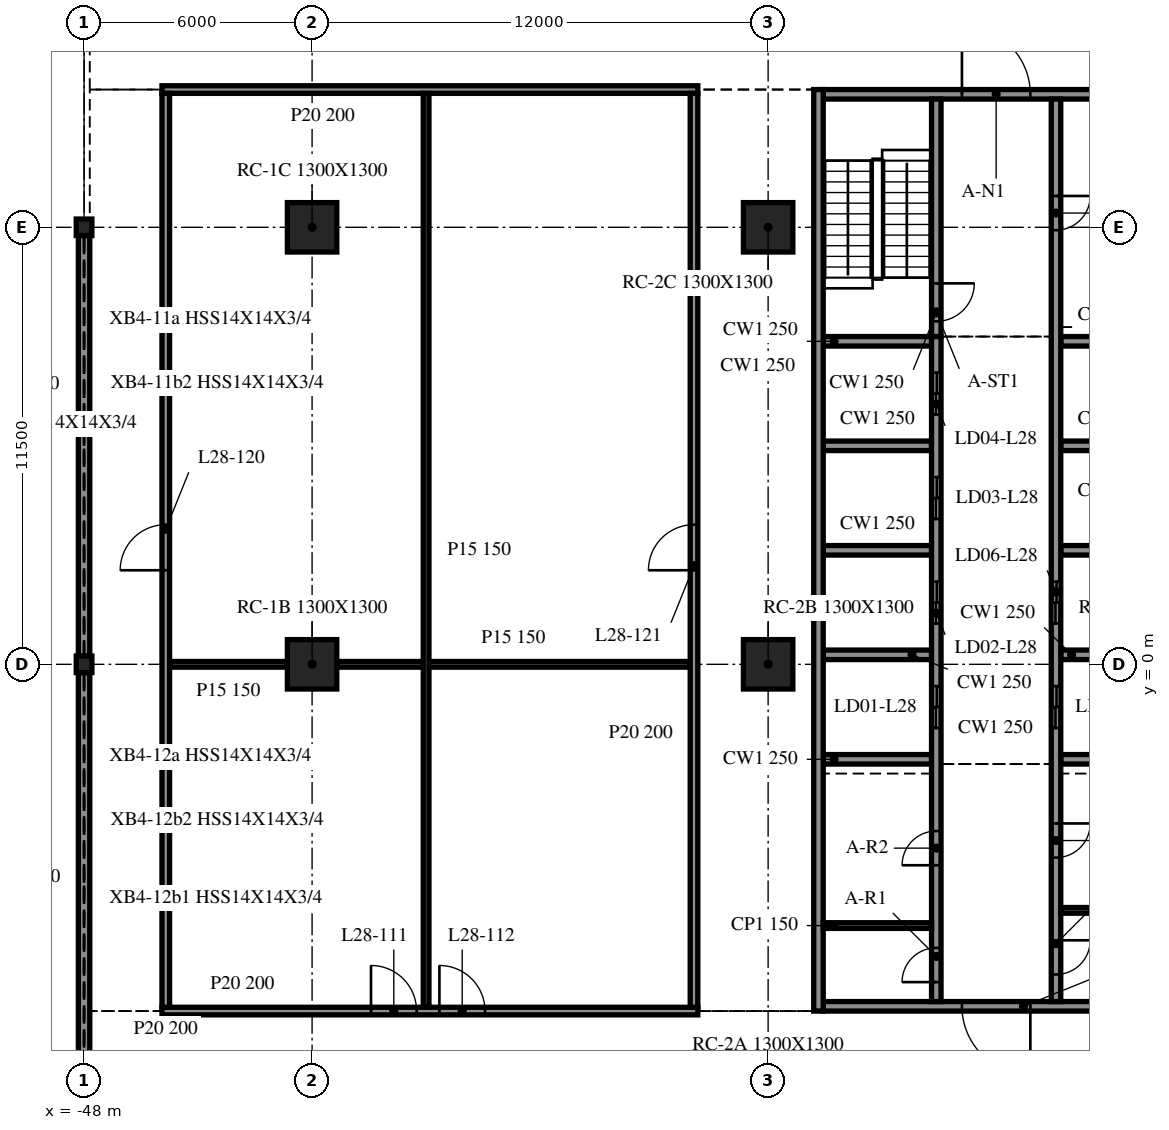
"""IFC4 building model, lengths in metres.
Left out: names, types, materials, properties, quantities, classifications, styles, units other than length and angle.
Written with IfcOpenShell. Run it as: python <this file> out.ifc"""

import sys

from ifc_helpers import new_model, si_unit, direction, frame, frame_2d, origin, origin_2d, place, context, subcontext, project, spatial, rectangle, i_section, extrude, element, fill, save


model = new_model("IFC4")
c1 = context("Model", 3, precision=1e-05, world=origin(), true_north=direction((0.0, 1.0)))
c2 = subcontext(c1, "Body", "Model", "MODEL_VIEW")
j1 = project(units=[si_unit("LENGTHUNIT", "METRE"), si_unit("PLANEANGLEUNIT", "RADIAN")], contexts=[c1])
p1 = place(None, origin())
s1 = spatial("IfcSite", under=j1, at=p1, CompositionType="ELEMENT")
p2 = place(p1, origin())
s2 = spatial("IfcBuilding", under=s1, at=p2, CompositionType="ELEMENT")
p3 = place(p2, frame((0.0, 0.0, 122.0)))
s3 = spatial("IfcBuildingStorey", under=s2, at=p3, CompositionType="ELEMENT", Elevation=122.0)
for number, where, z_axis, x_axis in (
    (1, (-42.0, 0.0, -0.34), (0.0, 0.0, 1.0), (1.0, 0.0, 0.0)),
    (2, (-42.0, 11.5, -0.34), (0.0, 0.0, 1.0), (1.0, 0.0, 0.0)),
    (3, (-30.0, 0.0, -0.34), (0.0, 0.0, 1.0), (1.0, 0.0, 0.0)),
    (4, (-30.0, 11.5, -0.34), (0.0, 0.0, 1.0), (1.0, 0.0, 0.0)),
):
    element("IfcColumn", number, at=place(p3, frame(where, z_axis=z_axis, x_axis=x_axis)), inside=s3, PredefinedType="COLUMN", context=c2, shape_type="SweptSolid", body=[
        extrude(rectangle(XDim=1.3, YDim=1.3, at=origin_2d()), origin(), (0.0, 0.0, 1.0), 4.1),
    ])
for number, where, z_axis, x_axis in (
    (5, (-48.0, 11.5, -0.34), (0.0, 0.0, 1.0), (1.0, 0.0, 0.0)),
    (6, (-48.0, 0.0, -0.34), (0.0, 0.0, 1.0), (1.0, 0.0, 0.0)),
):
    element("IfcColumn", number, at=place(p3, frame(where, z_axis=z_axis, x_axis=x_axis)), inside=s3, PredefinedType="COLUMN", context=c2, shape_type="SweptSolid", body=[
        extrude(i_section(OverallWidth=0.412, OverallDepth=0.434, WebThickness=0.036, FlangeThickness=0.057, at=origin_2d()), origin(), (0.0, 0.0, 1.0), 4.1),
    ])
p4 = place(p3, frame((-48.0, 11.282, 0.0), z_axis=(0.0, 0.0, 1.0), x_axis=(0.0, -1.0, 0.0)))
e7 = element("IfcWall", 7, at=p4, inside=s3, PredefinedType="NOTDEFINED", context=c2, shape_type="SweptSolid", body=[
    extrude(rectangle(XDim=11.064, YDim=0.3, at=frame_2d((5.532, 0.0))), origin(), (0.0, 0.0, 1.0), 3.003),
])
p5 = place(p3, frame((-48.0, -0.218, 0.0), z_axis=(0.0, 0.0, 1.0), x_axis=(0.0, -1.0, 0.0)))
e8 = element("IfcWall", 8, at=p5, inside=s3, PredefinedType="NOTDEFINED", context=c2, shape_type="SweptSolid", body=[
    extrude(rectangle(XDim=10.782, YDim=0.3, at=frame_2d((5.391, 0.0))), origin(), (0.0, 0.0, 1.0), 3.003),
])
p6 = place(p3, frame((-28.675, 15.125, 0.0), z_axis=(0.0, 0.0, 1.0), x_axis=(0.0, -1.0, 0.0)))
e9 = element("IfcWall", 9, at=p6, inside=s3, PredefinedType="SOLIDWALL", context=c2, shape_type="SweptSolid", body=[
    extrude(rectangle(XDim=24.25, YDim=0.25, at=frame_2d((12.125, 0.0))), origin(), (0.0, 0.0, 1.0), 3.76),
])
p7 = place(p3, frame((-19.45, -9.0, 0.0), z_axis=(0.0, 0.0, 1.0), x_axis=(-1.0, 0.0, 0.0)))
e10 = element("IfcWall", 10, at=p7, inside=s3, PredefinedType="SOLIDWALL", context=c2, shape_type="SweptSolid", body=[
    extrude(rectangle(XDim=9.1, YDim=0.25, at=frame_2d((4.55, 0.0))), origin(), (0.0, 0.0, 1.0), 3.76),
])
p8 = place(p7, frame((3.65, 0.0, 0.0)))
e11 = element("IfcOpeningElement", 11, at=p8, cuts=e10, PredefinedType="OPENING", context=c2, shape_type="SweptSolid", body=[
    extrude(rectangle(XDim=1.8, YDim=2.1, at=frame_2d((0.9, 1.05))), frame((0.0, 0.135, 0.0), z_axis=(0.0, -1.0, 0.0), x_axis=(1.0, 0.0, 0.0)), (0.0, 0.0, 1.0), 0.27),
])
p9 = place(p3, frame((-28.55, 15.0, 0.0), z_axis=(0.0, 0.0, 1.0), x_axis=(1.0, 0.0, 0.0)))
e12 = element("IfcWall", 12, at=p9, inside=s3, PredefinedType="SOLIDWALL", context=c2, shape_type="SweptSolid", body=[
    extrude(rectangle(XDim=9.1, YDim=0.25, at=frame_2d((4.55, 0.0))), origin(), (0.0, 0.0, 1.0), 3.76),
])
p10 = place(p9, frame((3.65, 0.0, 0.0)))
e13 = element("IfcOpeningElement", 13, at=p10, cuts=e12, PredefinedType="OPENING", context=c2, shape_type="SweptSolid", body=[
    extrude(rectangle(XDim=1.8, YDim=2.1, at=frame_2d((0.9, 1.05))), frame((0.0, 0.135, 0.0), z_axis=(0.0, -1.0, 0.0), x_axis=(1.0, 0.0, 0.0)), (0.0, 0.0, 1.0), 0.27),
])
p11 = place(p3, frame((-25.575, -8.875, 0.0), z_axis=(0.0, 0.0, 1.0), x_axis=(0.0, 1.0, 0.0)))
e14 = element("IfcWall", 14, at=p11, inside=s3, PredefinedType="SOLIDWALL", context=c2, shape_type="SweptSolid", body=[
    extrude(rectangle(XDim=17.5, YDim=0.25, at=frame_2d((8.75, 0.0))), origin(), (0.0, 0.0, 1.0), 3.76),
])
p12 = place(p11, frame((7.2, 0.0, 0.0)))
e15 = element("IfcOpeningElement", 15, at=p12, cuts=e14, PredefinedType="OPENING", context=c2, shape_type="SweptSolid", body=[
    extrude(rectangle(XDim=1.1, YDim=2.1, at=frame_2d((0.55, 1.05))), frame((0.0, 0.135, 0.0), z_axis=(0.0, -1.0, 0.0), x_axis=(1.0, 0.0, 0.0)), (0.0, 0.0, 1.0), 0.27),
])
p13 = place(p11, frame((9.95, 0.0, 0.0)))
e16 = element("IfcOpeningElement", 16, at=p13, cuts=e14, PredefinedType="OPENING", context=c2, shape_type="SweptSolid", body=[
    extrude(rectangle(XDim=1.1, YDim=2.1, at=frame_2d((0.55, 1.05))), frame((0.0, 0.135, 0.0), z_axis=(0.0, -1.0, 0.0), x_axis=(1.0, 0.0, 0.0)), (0.0, 0.0, 1.0), 0.27),
])
p14 = place(p11, frame((12.7, 0.0, 0.0)))
e17 = element("IfcOpeningElement", 17, at=p14, cuts=e14, PredefinedType="OPENING", context=c2, shape_type="SweptSolid", body=[
    extrude(rectangle(XDim=1.1, YDim=2.1, at=frame_2d((0.55, 1.05))), frame((0.0, 0.135, 0.0), z_axis=(0.0, -1.0, 0.0), x_axis=(1.0, 0.0, 0.0)), (0.0, 0.0, 1.0), 0.27),
])
p15 = place(p11, frame((15.45, 0.0, 0.0)))
e18 = element("IfcOpeningElement", 18, at=p15, cuts=e14, PredefinedType="OPENING", context=c2, shape_type="SweptSolid", body=[
    extrude(rectangle(XDim=1.1, YDim=2.1, at=frame_2d((0.55, 1.05))), frame((0.0, 0.135, 0.0), z_axis=(0.0, -1.0, 0.0), x_axis=(1.0, 0.0, 0.0)), (0.0, 0.0, 1.0), 0.27),
])
p16 = place(p11, frame((0.512, 0.0, 0.0)))
e19 = element("IfcOpeningElement", 19, at=p16, cuts=e14, PredefinedType="OPENING", context=c2, shape_type="SweptSolid", body=[
    extrude(rectangle(XDim=0.9, YDim=2.1, at=frame_2d((0.45, 1.05))), frame((0.0, 0.135, 0.0), z_axis=(0.0, -1.0, 0.0), x_axis=(1.0, 0.0, 0.0)), (0.0, 0.0, 1.0), 0.27),
])
p17 = place(p11, frame((3.587, 0.0, 0.0)))
e20 = element("IfcOpeningElement", 20, at=p17, cuts=e14, PredefinedType="OPENING", context=c2, shape_type="SweptSolid", body=[
    extrude(rectangle(XDim=0.9, YDim=2.1, at=frame_2d((0.45, 1.05))), frame((0.0, 0.135, 0.0), z_axis=(0.0, -1.0, 0.0), x_axis=(1.0, 0.0, 0.0)), (0.0, 0.0, 1.0), 0.27),
])
p18 = place(p3, frame((-25.575, 14.875, 0.0), z_axis=(0.0, 0.0, 1.0), x_axis=(0.0, -1.0, 0.0)))
e21 = element("IfcWall", 21, at=p18, inside=s3, PredefinedType="SOLIDWALL", context=c2, shape_type="SweptSolid", body=[
    extrude(rectangle(XDim=6.25, YDim=0.25, at=frame_2d((3.125, 0.0))), origin(), (0.0, 0.0, 1.0), 3.76),
])
p19 = place(p18, frame((4.85, 0.0, 0.0)))
e22 = element("IfcOpeningElement", 22, at=p19, cuts=e21, PredefinedType="OPENING", context=c2, shape_type="SweptSolid", body=[
    extrude(rectangle(XDim=1.0, YDim=2.1, at=frame_2d((0.5, 1.05))), frame((0.0, 0.135, 0.0), z_axis=(0.0, -1.0, 0.0), x_axis=(1.0, 0.0, 0.0)), (0.0, 0.0, 1.0), 0.27),
])
p20 = place(p3, frame((-22.425, 14.875, 0.0), z_axis=(0.0, 0.0, 1.0), x_axis=(0.0, -1.0, 0.0)))
e23 = element("IfcWall", 23, at=p20, inside=s3, PredefinedType="SOLIDWALL", context=c2, shape_type="SweptSolid", body=[
    extrude(rectangle(XDim=23.75, YDim=0.25, at=frame_2d((11.875, 0.0))), origin(), (0.0, 0.0, 1.0), 3.76),
])
p21 = place(p20, frame((15.45, 0.0, 0.0)))
e24 = element("IfcOpeningElement", 24, at=p21, cuts=e23, PredefinedType="OPENING", context=c2, shape_type="SweptSolid", body=[
    extrude(rectangle(XDim=1.1, YDim=2.1, at=frame_2d((0.55, 1.05))), frame((0.0, 0.135, 0.0), z_axis=(0.0, -1.0, 0.0), x_axis=(1.0, 0.0, 0.0)), (0.0, 0.0, 1.0), 0.27),
])
p22 = place(p20, frame((12.7, 0.0, 0.0)))
e25 = element("IfcOpeningElement", 25, at=p22, cuts=e23, PredefinedType="OPENING", context=c2, shape_type="SweptSolid", body=[
    extrude(rectangle(XDim=1.1, YDim=2.1, at=frame_2d((0.55, 1.05))), frame((0.0, 0.135, 0.0), z_axis=(0.0, -1.0, 0.0), x_axis=(1.0, 0.0, 0.0)), (0.0, 0.0, 1.0), 0.27),
])
p23 = place(p20, frame((22.137, 0.0, 0.0)))
e26 = element("IfcOpeningElement", 26, at=p23, cuts=e23, PredefinedType="OPENING", context=c2, shape_type="SweptSolid", body=[
    extrude(rectangle(XDim=0.9, YDim=2.1, at=frame_2d((0.45, 1.05))), frame((0.0, 0.135, 0.0), z_axis=(0.0, -1.0, 0.0), x_axis=(1.0, 0.0, 0.0)), (0.0, 0.0, 1.0), 0.27),
])
p24 = place(p20, frame((19.062, 0.0, 0.0)))
e27 = element("IfcOpeningElement", 27, at=p24, cuts=e23, PredefinedType="OPENING", context=c2, shape_type="SweptSolid", body=[
    extrude(rectangle(XDim=0.9, YDim=2.1, at=frame_2d((0.45, 1.05))), frame((0.0, 0.135, 0.0), z_axis=(0.0, -1.0, 0.0), x_axis=(1.0, 0.0, 0.0)), (0.0, 0.0, 1.0), 0.27),
])
p25 = place(p20, frame((2.55, 0.0, 0.0)))
e28 = element("IfcOpeningElement", 28, at=p25, cuts=e23, PredefinedType="OPENING", context=c2, shape_type="SweptSolid", body=[
    extrude(rectangle(XDim=0.9, YDim=2.1, at=frame_2d((0.45, 1.05))), frame((0.0, 0.135, 0.0), z_axis=(0.0, -1.0, 0.0), x_axis=(1.0, 0.0, 0.0)), (0.0, 0.0, 1.0), 0.27),
])
for number, where, z_axis, x_axis in (
    (29, (-28.55, -2.5, 0.0), (0.0, 0.0, 1.0), (1.0, 0.0, 0.0)),
    (30, (-28.55, 0.25, 0.0), (0.0, 0.0, 1.0), (1.0, 0.0, 0.0)),
    (31, (-28.55, 3.0, 0.0), (0.0, 0.0, 1.0), (1.0, 0.0, 0.0)),
    (32, (-28.55, 5.75, 0.0), (0.0, 0.0, 1.0), (1.0, 0.0, 0.0)),
    (33, (-28.55, 8.5, 0.0), (0.0, 0.0, 1.0), (1.0, 0.0, 0.0)),
    (34, (-22.3, -2.5, 0.0), (0.0, 0.0, 1.0), (1.0, 0.0, 0.0)),
    (35, (-22.3, 0.25, 0.0), (0.0, 0.0, 1.0), (1.0, 0.0, 0.0)),
    (36, (-22.3, 3.0, 0.0), (0.0, 0.0, 1.0), (1.0, 0.0, 0.0)),
    (37, (-22.3, 5.75, 0.0), (0.0, 0.0, 1.0), (1.0, 0.0, 0.0)),
    (38, (-22.3, 8.5, 0.0), (0.0, 0.0, 1.0), (1.0, 0.0, 0.0)),
):
    element("IfcWall", number, at=place(p3, frame(where, z_axis=z_axis, x_axis=x_axis)), inside=s3, PredefinedType="SOLIDWALL", context=c2, shape_type="SweptSolid", body=[
        extrude(rectangle(XDim=2.85, YDim=0.25, at=frame_2d((1.425, 0.0))), origin(), (0.0, 0.0, 1.0), 3.76),
    ])
for number, where, z_axis, x_axis in (
    (39, (-28.55, -6.875, 0.0), (0.0, 0.0, 1.0), (1.0, 0.0, 0.0)),
    (40, (-22.3, -6.475, 0.0), (0.0, 0.0, 1.0), (1.0, 0.0, 0.0)),
):
    element("IfcWall", number, at=place(p3, frame(where, z_axis=z_axis, x_axis=x_axis)), inside=s3, PredefinedType="PARTITIONING", context=c2, shape_type="SweptSolid", body=[
        extrude(rectangle(XDim=2.85, YDim=0.15, at=frame_2d((1.425, 0.0))), origin(), (0.0, 0.0, 1.0), 3.76),
    ])
p26 = place(p3, frame((-45.95, -9.125, 0.0), z_axis=(0.0, 0.0, 1.0), x_axis=(1.0, 0.0, 0.0)))
e41 = element("IfcWall", 41, at=p26, inside=s3, PredefinedType="PARTITIONING", context=c2, shape_type="SweptSolid", body=[
    extrude(rectangle(XDim=14.1, YDim=0.2, at=frame_2d((7.05, 0.0))), origin(), (0.0, 0.0, 1.0), 3.76),
])
p27 = place(p26, frame((5.5, 0.0, 0.0)))
e42 = element("IfcOpeningElement", 42, at=p27, cuts=e41, PredefinedType="OPENING", context=c2, shape_type="SweptSolid", body=[
    extrude(rectangle(XDim=1.2, YDim=2.1, at=frame_2d((0.6, 1.05))), frame((0.0, 0.11, 0.0), z_axis=(0.0, -1.0, 0.0), x_axis=(1.0, 0.0, 0.0)), (0.0, 0.0, 1.0), 0.22),
])
p28 = place(p26, frame((7.3, 0.0, 0.0)))
e43 = element("IfcOpeningElement", 43, at=p28, cuts=e41, PredefinedType="OPENING", context=c2, shape_type="SweptSolid", body=[
    extrude(rectangle(XDim=1.2, YDim=2.1, at=frame_2d((0.6, 1.05))), frame((0.0, 0.11, 0.0), z_axis=(0.0, -1.0, 0.0), x_axis=(1.0, 0.0, 0.0)), (0.0, 0.0, 1.0), 0.22),
])
p29 = place(p3, frame((-45.75, 0.0, 0.0), z_axis=(0.0, 0.0, 1.0), x_axis=(1.0, 0.0, 0.0)))
e44 = element("IfcWall", 44, at=p29, inside=s3, PredefinedType="PARTITIONING", context=c2, shape_type="SweptSolid", body=[
    extrude(rectangle(XDim=3.1, YDim=0.15, at=frame_2d((1.55, 0.0))), origin(), (0.0, 0.0, 1.0), 3.76),
])
p30 = place(p3, frame((-41.35, 0.0, 0.0), z_axis=(0.0, 0.0, 1.0), x_axis=(1.0, 0.0, 0.0)))
e45 = element("IfcWall", 45, at=p30, inside=s3, PredefinedType="PARTITIONING", context=c2, shape_type="SweptSolid", body=[
    extrude(rectangle(XDim=9.3, YDim=0.15, at=frame_2d((4.65, 0.0))), origin(), (0.0, 0.0, 1.0), 3.76),
])
p31 = place(p3, frame((-45.95, 15.125, 0.0), z_axis=(0.0, 0.0, 1.0), x_axis=(1.0, 0.0, 0.0)))
e46 = element("IfcWall", 46, at=p31, inside=s3, PredefinedType="PARTITIONING", context=c2, shape_type="SweptSolid", body=[
    extrude(rectangle(XDim=14.1, YDim=0.2, at=frame_2d((7.05, 0.0))), origin(), (0.0, 0.0, 1.0), 3.76),
])
p32 = place(p3, frame((-45.85, -9.025, 0.0), z_axis=(0.0, 0.0, 1.0), x_axis=(0.0, 1.0, 0.0)))
e47 = element("IfcWall", 47, at=p32, inside=s3, PredefinedType="PARTITIONING", context=c2, shape_type="SweptSolid", body=[
    extrude(rectangle(XDim=24.05, YDim=0.2, at=frame_2d((12.025, 0.0))), origin(), (0.0, 0.0, 1.0), 3.76),
])
p33 = place(p32, frame((11.5, 0.0, 0.0)))
e48 = element("IfcOpeningElement", 48, at=p33, cuts=e47, PredefinedType="OPENING", context=c2, shape_type="SweptSolid", body=[
    extrude(rectangle(XDim=1.2, YDim=2.1, at=frame_2d((0.6, 1.05))), frame((0.0, 0.11, 0.0), z_axis=(0.0, -1.0, 0.0), x_axis=(1.0, 0.0, 0.0)), (0.0, 0.0, 1.0), 0.22),
])
p34 = place(p3, frame((-39.0, -9.025, 0.0), z_axis=(0.0, 0.0, 1.0), x_axis=(0.0, 1.0, 0.0)))
e49 = element("IfcWall", 49, at=p34, inside=s3, PredefinedType="PARTITIONING", context=c2, shape_type="SweptSolid", body=[
    extrude(rectangle(XDim=24.05, YDim=0.15, at=frame_2d((12.025, 0.0))), origin(), (0.0, 0.0, 1.0), 3.76),
])
p35 = place(p3, frame((-31.95, -9.025, 0.0), z_axis=(0.0, 0.0, 1.0), x_axis=(0.0, 1.0, 0.0)))
e50 = element("IfcWall", 50, at=p35, inside=s3, PredefinedType="PARTITIONING", context=c2, shape_type="SweptSolid", body=[
    extrude(rectangle(XDim=24.05, YDim=0.2, at=frame_2d((12.025, 0.0))), origin(), (0.0, 0.0, 1.0), 3.76),
])
p36 = place(p35, frame((11.5, 0.0, 0.0)))
e51 = element("IfcOpeningElement", 51, at=p36, cuts=e50, PredefinedType="OPENING", context=c2, shape_type="SweptSolid", body=[
    extrude(rectangle(XDim=1.2, YDim=2.1, at=frame_2d((0.6, 1.05))), frame((0.0, 0.11, 0.0), z_axis=(0.0, -1.0, 0.0), x_axis=(1.0, 0.0, 0.0)), (0.0, 0.0, 1.0), 0.22),
])
p37 = place(p8, origin())
e52 = element("IfcDoor", 52, at=p37, inside=s3, OperationType="DOUBLE_DOOR_SINGLE_SWING", PredefinedType="DOOR", context=c2, shape_type="SweptSolid", body=[
    extrude(rectangle(XDim=1.8, YDim=2.1, at=frame_2d((0.9, 1.05))), frame((0.0, 0.025, 0.0), z_axis=(0.0, -1.0, 0.0), x_axis=(1.0, 0.0, 0.0)), (0.0, 0.0, 1.0), 0.05),
])
fill(e11, e52)
p38 = place(p10, origin())
e53 = element("IfcDoor", 53, at=p38, inside=s3, OperationType="DOUBLE_DOOR_SINGLE_SWING", PredefinedType="DOOR", context=c2, shape_type="SweptSolid", body=[
    extrude(rectangle(XDim=1.8, YDim=2.1, at=frame_2d((0.9, 1.05))), frame((0.0, 0.025, 0.0), z_axis=(0.0, -1.0, 0.0), x_axis=(1.0, 0.0, 0.0)), (0.0, 0.0, 1.0), 0.05),
])
fill(e13, e53)
p39 = place(p21, origin())
e54 = element("IfcDoor", 54, at=p39, inside=s3, OperationType="DOUBLE_DOOR_SLIDING", PredefinedType="DOOR", context=c2, shape_type="SweptSolid", body=[
    extrude(rectangle(XDim=1.1, YDim=2.1, at=frame_2d((0.55, 1.05))), frame((0.0, 0.025, 0.0), z_axis=(0.0, -1.0, 0.0), x_axis=(1.0, 0.0, 0.0)), (0.0, 0.0, 1.0), 0.05),
])
fill(e24, e54)
p40 = place(p22, origin())
e55 = element("IfcDoor", 55, at=p40, inside=s3, OperationType="DOUBLE_DOOR_SLIDING", PredefinedType="DOOR", context=c2, shape_type="SweptSolid", body=[
    extrude(rectangle(XDim=1.1, YDim=2.1, at=frame_2d((0.55, 1.05))), frame((0.0, 0.025, 0.0), z_axis=(0.0, -1.0, 0.0), x_axis=(1.0, 0.0, 0.0)), (0.0, 0.0, 1.0), 0.05),
])
fill(e25, e55)
p41 = place(p12, origin())
e56 = element("IfcDoor", 56, at=p41, inside=s3, OperationType="DOUBLE_DOOR_SLIDING", PredefinedType="DOOR", context=c2, shape_type="SweptSolid", body=[
    extrude(rectangle(XDim=1.1, YDim=2.1, at=frame_2d((0.55, 1.05))), frame((0.0, 0.025, 0.0), z_axis=(0.0, -1.0, 0.0), x_axis=(1.0, 0.0, 0.0)), (0.0, 0.0, 1.0), 0.05),
])
fill(e15, e56)
p42 = place(p13, origin())
e57 = element("IfcDoor", 57, at=p42, inside=s3, OperationType="DOUBLE_DOOR_SLIDING", PredefinedType="DOOR", context=c2, shape_type="SweptSolid", body=[
    extrude(rectangle(XDim=1.1, YDim=2.1, at=frame_2d((0.55, 1.05))), frame((0.0, 0.025, 0.0), z_axis=(0.0, -1.0, 0.0), x_axis=(1.0, 0.0, 0.0)), (0.0, 0.0, 1.0), 0.05),
])
fill(e16, e57)
p43 = place(p14, origin())
e58 = element("IfcDoor", 58, at=p43, inside=s3, OperationType="DOUBLE_DOOR_SLIDING", PredefinedType="DOOR", context=c2, shape_type="SweptSolid", body=[
    extrude(rectangle(XDim=1.1, YDim=2.1, at=frame_2d((0.55, 1.05))), frame((0.0, 0.025, 0.0), z_axis=(0.0, -1.0, 0.0), x_axis=(1.0, 0.0, 0.0)), (0.0, 0.0, 1.0), 0.05),
])
fill(e17, e58)
p44 = place(p15, origin())
e59 = element("IfcDoor", 59, at=p44, inside=s3, OperationType="DOUBLE_DOOR_SLIDING", PredefinedType="DOOR", context=c2, shape_type="SweptSolid", body=[
    extrude(rectangle(XDim=1.1, YDim=2.1, at=frame_2d((0.55, 1.05))), frame((0.0, 0.025, 0.0), z_axis=(0.0, -1.0, 0.0), x_axis=(1.0, 0.0, 0.0)), (0.0, 0.0, 1.0), 0.05),
])
fill(e18, e59)
p45 = place(p16, origin())
e60 = element("IfcDoor", 60, at=p45, inside=s3, OperationType="SINGLE_SWING_LEFT", PredefinedType="DOOR", context=c2, shape_type="SweptSolid", body=[
    extrude(rectangle(XDim=0.9, YDim=2.1, at=frame_2d((0.45, 1.05))), frame((0.0, 0.025, 0.0), z_axis=(0.0, -1.0, 0.0), x_axis=(1.0, 0.0, 0.0)), (0.0, 0.0, 1.0), 0.05),
])
fill(e19, e60)
p46 = place(p17, origin())
e61 = element("IfcDoor", 61, at=p46, inside=s3, OperationType="SINGLE_SWING_RIGHT", PredefinedType="DOOR", context=c2, shape_type="SweptSolid", body=[
    extrude(rectangle(XDim=0.9, YDim=2.1, at=frame_2d((0.45, 1.05))), frame((0.0, 0.025, 0.0), z_axis=(0.0, -1.0, 0.0), x_axis=(1.0, 0.0, 0.0)), (0.0, 0.0, 1.0), 0.05),
])
fill(e20, e61)
p47 = place(p23, origin())
e62 = element("IfcDoor", 62, at=p47, inside=s3, OperationType="SINGLE_SWING_LEFT", PredefinedType="DOOR", context=c2, shape_type="SweptSolid", body=[
    extrude(rectangle(XDim=0.9, YDim=2.1, at=frame_2d((0.45, 1.05))), frame((0.0, 0.025, 0.0), z_axis=(0.0, -1.0, 0.0), x_axis=(1.0, 0.0, 0.0)), (0.0, 0.0, 1.0), 0.05),
])
fill(e26, e62)
p48 = place(p24, origin())
e63 = element("IfcDoor", 63, at=p48, inside=s3, OperationType="SINGLE_SWING_RIGHT", PredefinedType="DOOR", context=c2, shape_type="SweptSolid", body=[
    extrude(rectangle(XDim=0.9, YDim=2.1, at=frame_2d((0.45, 1.05))), frame((0.0, 0.025, 0.0), z_axis=(0.0, -1.0, 0.0), x_axis=(1.0, 0.0, 0.0)), (0.0, 0.0, 1.0), 0.05),
])
fill(e27, e63)
p49 = place(p25, origin())
e64 = element("IfcDoor", 64, at=p49, inside=s3, OperationType="SINGLE_SWING_LEFT", PredefinedType="DOOR", context=c2, shape_type="SweptSolid", body=[
    extrude(rectangle(XDim=0.9, YDim=2.1, at=frame_2d((0.45, 1.05))), frame((0.0, 0.025, 0.0), z_axis=(0.0, -1.0, 0.0), x_axis=(1.0, 0.0, 0.0)), (0.0, 0.0, 1.0), 0.05),
])
fill(e28, e64)
p50 = place(p19, origin())
e65 = element("IfcDoor", 65, at=p50, inside=s3, OperationType="SINGLE_SWING_RIGHT", PredefinedType="DOOR", context=c2, shape_type="SweptSolid", body=[
    extrude(rectangle(XDim=1.0, YDim=2.1, at=frame_2d((0.5, 1.05))), frame((0.0, 0.025, 0.0), z_axis=(0.0, -1.0, 0.0), x_axis=(1.0, 0.0, 0.0)), (0.0, 0.0, 1.0), 0.05),
])
fill(e22, e65)
p51 = place(p27, origin())
e66 = element("IfcDoor", 66, at=p51, inside=s3, OperationType="SINGLE_SWING_LEFT", PredefinedType="DOOR", context=c2, shape_type="SweptSolid", body=[
    extrude(rectangle(XDim=1.2, YDim=2.1, at=frame_2d((0.6, 1.05))), frame((0.0, 0.025, 0.0), z_axis=(0.0, -1.0, 0.0), x_axis=(1.0, 0.0, 0.0)), (0.0, 0.0, 1.0), 0.05),
])
fill(e42, e66)
p52 = place(p28, origin())
e67 = element("IfcDoor", 67, at=p52, inside=s3, OperationType="SINGLE_SWING_RIGHT", PredefinedType="DOOR", context=c2, shape_type="SweptSolid", body=[
    extrude(rectangle(XDim=1.2, YDim=2.1, at=frame_2d((0.6, 1.05))), frame((0.0, 0.025, 0.0), z_axis=(0.0, -1.0, 0.0), x_axis=(1.0, 0.0, 0.0)), (0.0, 0.0, 1.0), 0.05),
])
fill(e43, e67)
p53 = place(p33, origin())
e68 = element("IfcDoor", 68, at=p53, inside=s3, OperationType="SINGLE_SWING_LEFT", PredefinedType="DOOR", context=c2, shape_type="SweptSolid", body=[
    extrude(rectangle(XDim=1.2, YDim=2.1, at=frame_2d((0.6, 1.05))), frame((0.0, 0.025, 0.0), z_axis=(0.0, -1.0, 0.0), x_axis=(1.0, 0.0, 0.0)), (0.0, 0.0, 1.0), 0.05),
])
fill(e48, e68)
p54 = place(p36, origin())
e69 = element("IfcDoor", 69, at=p54, inside=s3, OperationType="SINGLE_SWING_RIGHT", PredefinedType="DOOR", context=c2, shape_type="SweptSolid", body=[
    extrude(rectangle(XDim=1.2, YDim=2.1, at=frame_2d((0.6, 1.05))), frame((0.0, 0.025, 0.0), z_axis=(0.0, -1.0, 0.0), x_axis=(1.0, 0.0, 0.0)), (0.0, 0.0, 1.0), 0.05),
])
fill(e51, e69)
save(model, sys.argv[1])
